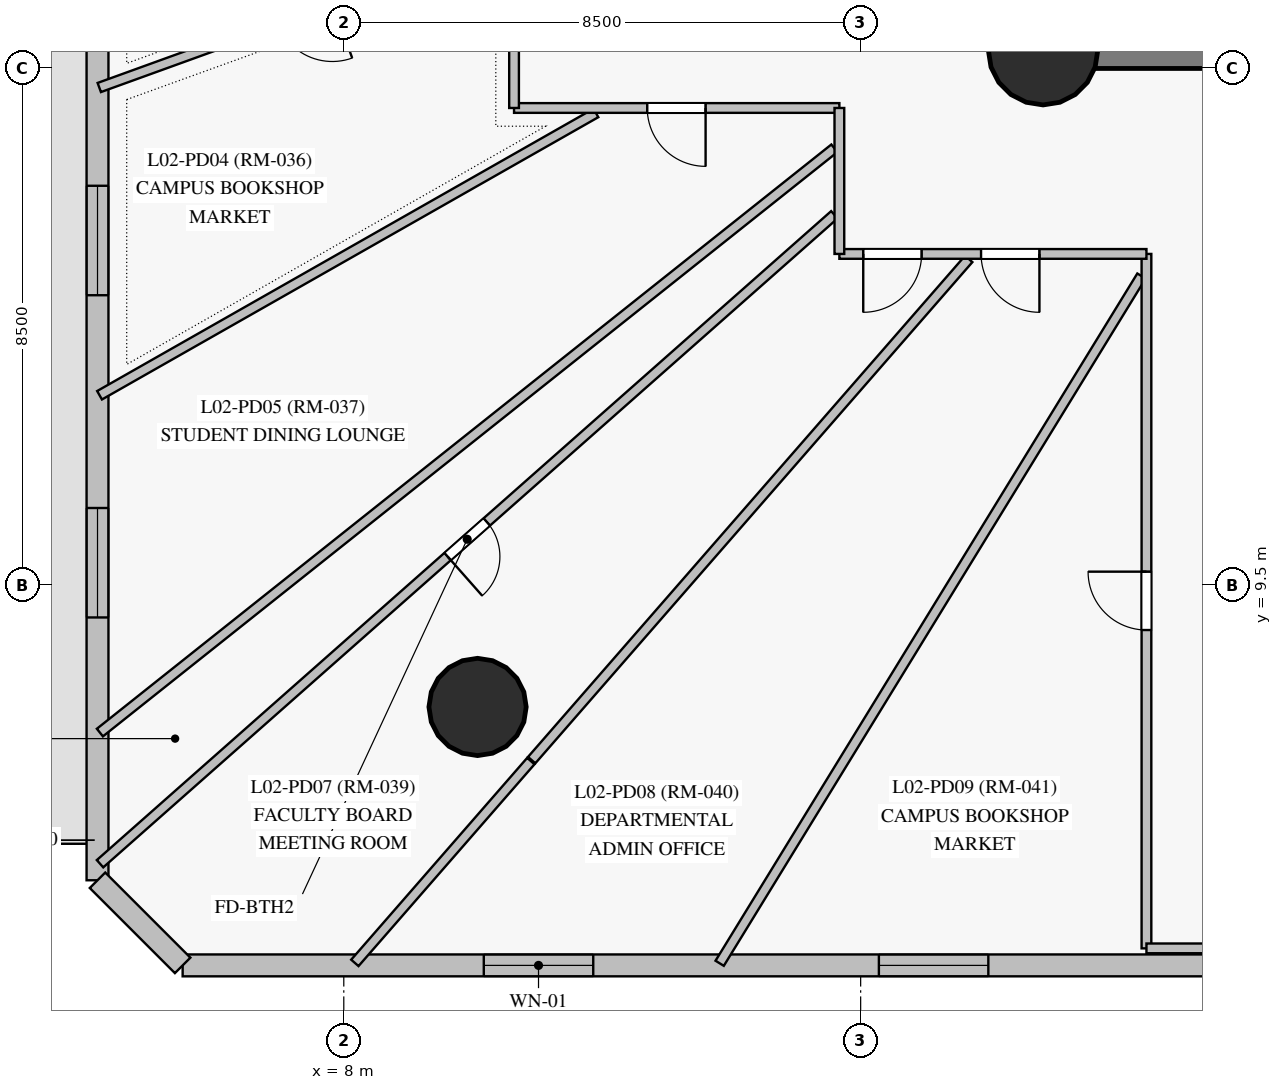
"""IFC4 building model, lengths in metres.
Left out: names, types, materials, properties, quantities, classifications, styles, units other than length and angle.
Written with IfcOpenShell. Run it as: python <this file> out.ifc"""

import sys

from ifc_helpers import new_model, si_unit, direction, frame, frame_2d, origin, origin_with_axes, origin_2d, place, context, subcontext, project, spatial, rectangle, circle, extrude, source, transform, mapped, element, fill, save


model = new_model("IFC4")
c1 = context("Model", 3, precision=1e-05, world=origin(), true_north=direction((0.0, 1.0)))
c2 = subcontext(c1, "Body", "Model", "MODEL_VIEW")
j1 = project(units=[si_unit("LENGTHUNIT", "METRE"), si_unit("PLANEANGLEUNIT", "RADIAN")], contexts=[c1])
p1 = place(None, origin())
s1 = spatial("IfcSite", under=j1, at=p1, CompositionType="ELEMENT")
p2 = place(p1, origin())
s2 = spatial("IfcBuilding", under=s1, at=p2, CompositionType="ELEMENT")
p3 = place(p2, frame((0.0, 0.0, 9.0)))
s3 = spatial("IfcBuildingStorey", under=s2, at=p3, CompositionType="ELEMENT", Elevation=9.0)
p4 = place(p3, frame((19.5, 18.3, 0.0), z_axis=(0.0, 0.0, 1.0), x_axis=(1.0, 0.0, 0.0)))
e1 = element("IfcWall", 1, at=p4, inside=s3, PredefinedType="SHEAR", context=c2, shape_type="SweptSolid", body=[
    extrude(rectangle(XDim=7.05, YDim=0.6, at=frame_2d((3.525, 0.0))), origin(), (0.0, 0.0, 1.0), 4.2),
])
p5 = place(p4, frame((4.2, 0.0, 0.0)))
e2 = element("IfcOpeningElement", 2, at=p5, cuts=e1, PredefinedType="OPENING", context=c2, shape_type="SweptSolid", body=[
    extrude(rectangle(XDim=1.4, YDim=2.2, at=frame_2d((0.7, 1.1))), frame((0.0, 0.31, 0.0), z_axis=(0.0, -1.0, 0.0), x_axis=(1.0, 0.0, 0.0)), (0.0, 0.0, 1.0), 0.62),
])
m1 = source(origin_with_axes(), c2, "Body", "SweptSolid", [
    extrude(circle(Radius=0.9, at=origin_2d()), origin(), (0.0, 0.0, 1.0), 4.5),
])
p6 = place(p3, frame((19.5, 18.3, 0.0), z_axis=(0.0, 0.0, 1.0), x_axis=(1.0, 0.0, 0.0)))
e3 = element("IfcColumn", 3, at=p6, inside=s3, PredefinedType="COLUMN", context=c2, shape_type="MappedRepresentation", body=[
    mapped(m1, transform((0.0, 0.0, 0.0), scale=1.0)),
])
m2 = source(origin_with_axes(), c2, "Body", "SweptSolid", [
    extrude(circle(Radius=0.8, at=origin_2d()), origin(), (0.0, 0.0, 1.0), 4.5),
])
p7 = place(p3, frame((10.2, 7.5, 0.0), z_axis=(0.0, 0.0, 1.0), x_axis=(1.0, 0.0, 0.0)))
e4 = element("IfcColumn", 4, at=p7, inside=s3, PredefinedType="COLUMN", context=c2, shape_type="MappedRepresentation", body=[
    mapped(m2, transform((0.0, 0.0, 0.0), scale=1.0)),
])
p8 = place(p3, frame((5.35, 3.25, 0.0), z_axis=(0.0, 0.0, 1.0), x_axis=(1.0, 0.0, 0.0)))
e5 = element("IfcWall", 5, at=p8, inside=s3, PredefinedType="SOLIDWALL", context=c2, shape_type="SweptSolid", body=[
    extrude(rectangle(XDim=49.25, YDim=0.36, at=frame_2d((24.625, 0.0))), origin(), (0.0, 0.0, 1.0), 4.2),
])
p9 = place(p8, frame((4.952, 0.0, 0.85)))
e6 = element("IfcOpeningElement", 6, at=p9, cuts=e5, PredefinedType="OPENING", context=c2, shape_type="SweptSolid", body=[
    extrude(rectangle(XDim=1.8, YDim=2.2, at=frame_2d((0.9, 1.1))), frame((0.0, 0.19, 0.0), z_axis=(0.0, -1.0, 0.0), x_axis=(1.0, 0.0, 0.0)), (0.0, 0.0, 1.0), 0.38),
])
p10 = place(p8, frame((11.45, 0.0, 0.85)))
e7 = element("IfcOpeningElement", 7, at=p10, cuts=e5, PredefinedType="OPENING", context=c2, shape_type="SweptSolid", body=[
    extrude(rectangle(XDim=1.8, YDim=2.2, at=frame_2d((0.9, 1.1))), frame((0.0, 0.19, 0.0), z_axis=(0.0, -1.0, 0.0), x_axis=(1.0, 0.0, 0.0)), (0.0, 0.0, 1.0), 0.38),
])
p11 = place(p8, frame((17.05, 0.0, 0.85)))
e8 = element("IfcOpeningElement", 8, at=p11, cuts=e5, PredefinedType="OPENING", context=c2, shape_type="SweptSolid", body=[
    extrude(rectangle(XDim=1.8, YDim=2.2, at=frame_2d((0.9, 1.1))), frame((0.0, 0.19, 0.0), z_axis=(0.0, -1.0, 0.0), x_axis=(1.0, 0.0, 0.0)), (0.0, 0.0, 1.0), 0.38),
])
p12 = place(p8, frame((23.505, 0.0, 0.85)))
e9 = element("IfcOpeningElement", 9, at=p12, cuts=e5, PredefinedType="OPENING", context=c2, shape_type="SweptSolid", body=[
    extrude(rectangle(XDim=1.8, YDim=2.2, at=frame_2d((0.9, 1.1))), frame((0.0, 0.19, 0.0), z_axis=(0.0, -1.0, 0.0), x_axis=(1.0, 0.0, 0.0)), (0.0, 0.0, 1.0), 0.38),
])
p13 = place(p8, frame((29.567, 0.0, 0.85)))
e10 = element("IfcOpeningElement", 10, at=p13, cuts=e5, PredefinedType="OPENING", context=c2, shape_type="SweptSolid", body=[
    extrude(rectangle(XDim=1.8, YDim=2.2, at=frame_2d((0.9, 1.1))), frame((0.0, 0.19, 0.0), z_axis=(0.0, -1.0, 0.0), x_axis=(1.0, 0.0, 0.0)), (0.0, 0.0, 1.0), 0.38),
])
p14 = place(p8, frame((33.402, 0.0, 0.85)))
e11 = element("IfcOpeningElement", 11, at=p14, cuts=e5, PredefinedType="OPENING", context=c2, shape_type="SweptSolid", body=[
    extrude(rectangle(XDim=1.8, YDim=2.2, at=frame_2d((0.9, 1.1))), frame((0.0, 0.19, 0.0), z_axis=(0.0, -1.0, 0.0), x_axis=(1.0, 0.0, 0.0)), (0.0, 0.0, 1.0), 0.38),
])
p15 = place(p8, frame((37.118, 0.0, 0.85)))
e12 = element("IfcOpeningElement", 12, at=p15, cuts=e5, PredefinedType="OPENING", context=c2, shape_type="SweptSolid", body=[
    extrude(rectangle(XDim=1.8, YDim=2.2, at=frame_2d((0.9, 1.1))), frame((0.0, 0.19, 0.0), z_axis=(0.0, -1.0, 0.0), x_axis=(1.0, 0.0, 0.0)), (0.0, 0.0, 1.0), 0.38),
])
p16 = place(p8, frame((42.171, 0.0, 0.85)))
e13 = element("IfcOpeningElement", 13, at=p16, cuts=e5, PredefinedType="OPENING", context=c2, shape_type="SweptSolid", body=[
    extrude(rectangle(XDim=1.8, YDim=2.2, at=frame_2d((0.9, 1.1))), frame((0.0, 0.19, 0.0), z_axis=(0.0, -1.0, 0.0), x_axis=(1.0, 0.0, 0.0)), (0.0, 0.0, 1.0), 0.38),
])
p17 = place(p8, frame((46.742, 0.0, 0.85)))
e14 = element("IfcOpeningElement", 14, at=p17, cuts=e5, PredefinedType="OPENING", context=c2, shape_type="SweptSolid", body=[
    extrude(rectangle(XDim=1.8, YDim=2.2, at=frame_2d((0.9, 1.1))), frame((0.0, 0.19, 0.0), z_axis=(0.0, -1.0, 0.0), x_axis=(1.0, 0.0, 0.0)), (0.0, 0.0, 1.0), 0.38),
])
p18 = place(p3, frame((3.95, 48.35, 0.0), z_axis=(0.0, 0.0, 1.0), x_axis=(0.0, -1.0, 0.0)))
e15 = element("IfcWall", 15, at=p18, inside=s3, PredefinedType="SOLIDWALL", context=c2, shape_type="SweptSolid", body=[
    extrude(rectangle(XDim=43.7, YDim=0.36, at=frame_2d((21.85, 0.0))), origin(), (0.0, 0.0, 1.0), 4.2),
])
p19 = place(p18, frame((1.439, 0.0, 0.85)))
e16 = element("IfcOpeningElement", 16, at=p19, cuts=e15, PredefinedType="OPENING", context=c2, shape_type="SweptSolid", body=[
    extrude(rectangle(XDim=1.8, YDim=2.2, at=frame_2d((0.9, 1.1))), frame((0.0, 0.19, 0.0), z_axis=(0.0, -1.0, 0.0), x_axis=(1.0, 0.0, 0.0)), (0.0, 0.0, 1.0), 0.38),
])
p20 = place(p18, frame((5.669, 0.0, 0.85)))
e17 = element("IfcOpeningElement", 17, at=p20, cuts=e15, PredefinedType="OPENING", context=c2, shape_type="SweptSolid", body=[
    extrude(rectangle(XDim=1.8, YDim=2.2, at=frame_2d((0.9, 1.1))), frame((0.0, 0.19, 0.0), z_axis=(0.0, -1.0, 0.0), x_axis=(1.0, 0.0, 0.0)), (0.0, 0.0, 1.0), 0.38),
])
p21 = place(p18, frame((15.485, 0.0, 0.85)))
e18 = element("IfcOpeningElement", 18, at=p21, cuts=e15, PredefinedType="OPENING", context=c2, shape_type="SweptSolid", body=[
    extrude(rectangle(XDim=1.8, YDim=2.2, at=frame_2d((0.9, 1.1))), frame((0.0, 0.19, 0.0), z_axis=(0.0, -1.0, 0.0), x_axis=(1.0, 0.0, 0.0)), (0.0, 0.0, 1.0), 0.38),
])
p22 = place(p18, frame((20.96, 0.0, 0.85)))
e19 = element("IfcOpeningElement", 19, at=p22, cuts=e15, PredefinedType="OPENING", context=c2, shape_type="SweptSolid", body=[
    extrude(rectangle(XDim=1.8, YDim=2.2, at=frame_2d((0.9, 1.1))), frame((0.0, 0.19, 0.0), z_axis=(0.0, -1.0, 0.0), x_axis=(1.0, 0.0, 0.0)), (0.0, 0.0, 1.0), 0.38),
])
p23 = place(p18, frame((28.012, 0.0, 0.85)))
e20 = element("IfcOpeningElement", 20, at=p23, cuts=e15, PredefinedType="OPENING", context=c2, shape_type="SweptSolid", body=[
    extrude(rectangle(XDim=1.8, YDim=2.2, at=frame_2d((0.9, 1.1))), frame((0.0, 0.19, 0.0), z_axis=(0.0, -1.0, 0.0), x_axis=(1.0, 0.0, 0.0)), (0.0, 0.0, 1.0), 0.38),
])
p24 = place(p18, frame((32.279, 0.0, 0.85)))
e21 = element("IfcOpeningElement", 21, at=p24, cuts=e15, PredefinedType="OPENING", context=c2, shape_type="SweptSolid", body=[
    extrude(rectangle(XDim=1.8, YDim=2.2, at=frame_2d((0.9, 1.1))), frame((0.0, 0.19, 0.0), z_axis=(0.0, -1.0, 0.0), x_axis=(1.0, 0.0, 0.0)), (0.0, 0.0, 1.0), 0.38),
])
p25 = place(p18, frame((37.578, 0.0, 0.85)))
e22 = element("IfcOpeningElement", 22, at=p25, cuts=e15, PredefinedType="OPENING", context=c2, shape_type="SweptSolid", body=[
    extrude(rectangle(XDim=1.8, YDim=2.2, at=frame_2d((0.9, 1.1))), frame((0.0, 0.19, 0.0), z_axis=(0.0, -1.0, 0.0), x_axis=(1.0, 0.0, 0.0)), (0.0, 0.0, 1.0), 0.38),
])
p26 = place(p18, frame((12.221, 0.0, 0.0)))
e23 = element("IfcOpeningElement", 23, at=p26, cuts=e15, PredefinedType="OPENING", context=c2, shape_type="SweptSolid", body=[
    extrude(rectangle(XDim=1.05, YDim=2.12, at=frame_2d((0.525, 1.06))), frame((0.0, 0.19, 0.0), z_axis=(0.0, -1.0, 0.0), x_axis=(1.0, 0.0, 0.0)), (0.0, 0.0, 1.0), 0.38),
])
p27 = place(p3, frame((3.95, 4.65, 0.0), z_axis=(0.0, 0.0, 1.0), x_axis=(0.707168432242, -0.707045124756, 0.0)))
e24 = element("IfcWall", 24, at=p27, inside=s3, PredefinedType="SOLIDWALL", context=c2, shape_type="SweptSolid", body=[
    extrude(rectangle(XDim=1.98, YDim=0.36, at=frame_2d((0.99, 0.0))), origin(), (0.0, 0.0, 1.0), 4.2),
])
p28 = place(p3, frame((16.068, 15.594, 0.0), z_axis=(0.0, 0.0, 1.0), x_axis=(-0.749344293453, -0.662180587052, 0.0)))
e25 = element("IfcWall", 25, at=p28, inside=s3, PredefinedType="PARTITIONING", context=c2, shape_type="SweptSolid", body=[
    extrude(rectangle(XDim=16.117, YDim=0.16, at=frame_2d((8.058, 0.0))), origin(), (0.0, 0.0, 1.0), 4.2),
])
p29 = place(p28, frame((7.628, 0.0, 0.0)))
e26 = element("IfcOpeningElement", 26, at=p29, cuts=e25, PredefinedType="OPENING", context=c2, shape_type="SweptSolid", body=[
    extrude(rectangle(XDim=0.86, YDim=2.04, at=frame_2d((0.43, 1.02))), frame((0.0, 0.09, 0.0), z_axis=(0.0, -1.0, 0.0), x_axis=(1.0, 0.0, 0.0)), (0.0, 0.0, 1.0), 0.18),
])
p30 = place(p3, frame((16.068, 16.687, 0.0), z_axis=(0.0, 0.0, 1.0), x_axis=(-0.782592647396, -0.622534134198, 0.0)))
e27 = element("IfcWall", 27, at=p30, inside=s3, PredefinedType="PARTITIONING", context=c2, shape_type="SweptSolid", body=[
    extrude(rectangle(XDim=15.435, YDim=0.16, at=frame_2d((7.717, 0.0))), origin(), (0.0, 0.0, 1.0), 4.2),
])
p31 = place(p3, frame((21.118, 14.587, 0.0), z_axis=(0.0, 0.0, 1.0), x_axis=(-0.523082178692, -0.852282250393, 0.0)))
e28 = element("IfcWall", 28, at=p31, inside=s3, PredefinedType="PARTITIONING", context=c2, shape_type="SweptSolid", body=[
    extrude(rectangle(XDim=13.261, YDim=0.16, at=frame_2d((6.63, 0.0))), origin(), (0.0, 0.0, 1.0), 4.2),
])
p32 = place(p3, frame((21.2, 3.53, 0.0), z_axis=(0.0, 0.0, 1.0), x_axis=(0.0, 1.0, 0.0)))
e29 = element("IfcWall", 29, at=p32, inside=s3, PredefinedType="PARTITIONING", context=c2, shape_type="SweptSolid", body=[
    extrude(rectangle(XDim=11.42, YDim=0.16, at=frame_2d((5.71, 0.0))), origin(), (0.0, 0.0, 1.0), 4.2),
])
p33 = place(p32, frame((5.235, 0.0, 0.0)))
e30 = element("IfcOpeningElement", 30, at=p33, cuts=e29, PredefinedType="OPENING", context=c2, shape_type="SweptSolid", body=[
    extrude(rectangle(XDim=0.96, YDim=2.15, at=frame_2d((0.48, 1.075))), frame((0.0, 0.09, 0.0), z_axis=(0.0, -1.0, 0.0), x_axis=(1.0, 0.0, 0.0)), (0.0, 0.0, 1.0), 0.18),
])
p34 = place(p3, frame((18.277, 14.868, 0.0), z_axis=(0.0, 0.0, 1.0), x_axis=(-0.657226588959, -0.753693048108, 0.0)))
e31 = element("IfcWall", 31, at=p34, inside=s3, PredefinedType="PARTITIONING", context=c2, shape_type="SweptSolid", body=[
    extrude(rectangle(XDim=10.936, YDim=0.16, at=frame_2d((5.468, 0.0))), origin(), (0.0, 0.0, 1.0), 4.2),
])
p35 = place(p3, frame((12.146, 17.268, 0.0), z_axis=(0.0, 0.0, 1.0), x_axis=(-0.869250906181, -0.494371178472, 0.0)))
e32 = element("IfcWall", 32, at=p35, inside=s3, PredefinedType="PARTITIONING", context=c2, shape_type="SweptSolid", body=[
    extrude(rectangle(XDim=9.39, YDim=0.16, at=frame_2d((4.695, 0.0))), origin(), (0.0, 0.0, 1.0), 4.2),
])
p36 = place(p3, frame((10.718, 20.126, 0.0), z_axis=(0.0, 0.0, 1.0), x_axis=(-0.940278821487, -0.340405255339, 0.0)))
e33 = element("IfcWall", 33, at=p36, inside=s3, PredefinedType="PARTITIONING", context=c2, shape_type="SweptSolid", body=[
    extrude(rectangle(XDim=7.167, YDim=0.16, at=frame_2d((3.583, 0.0))), origin(), (0.0, 0.0, 1.0), 4.2),
])
p37 = place(p36, frame((3.091, 0.0, 0.0)))
e34 = element("IfcOpeningElement", 34, at=p37, cuts=e33, PredefinedType="OPENING", context=c2, shape_type="SweptSolid", body=[
    extrude(rectangle(XDim=0.96, YDim=2.15, at=frame_2d((0.48, 1.075))), frame((0.0, 0.09, 0.0), z_axis=(0.0, -1.0, 0.0), x_axis=(1.0, 0.0, 0.0)), (0.0, 0.0, 1.0), 0.18),
])
p38 = place(p3, frame((16.15, 17.35, 0.0), z_axis=(0.0, 0.0, 1.0), x_axis=(-1.0, 0.0, 0.0)))
e35 = element("IfcWall", 35, at=p38, inside=s3, PredefinedType="PARTITIONING", context=c2, shape_type="SweptSolid", body=[
    extrude(rectangle(XDim=5.35, YDim=0.16, at=frame_2d((2.675, 0.0))), origin(), (0.0, 0.0, 1.0), 4.2),
])
p39 = place(p38, frame((2.2, 0.0, 0.0)))
e36 = element("IfcOpeningElement", 36, at=p39, cuts=e35, PredefinedType="OPENING", context=c2, shape_type="SweptSolid", body=[
    extrude(rectangle(XDim=0.96, YDim=2.15, at=frame_2d((0.48, 1.075))), frame((0.0, 0.09, 0.0), z_axis=(0.0, -1.0, 0.0), x_axis=(1.0, 0.0, 0.0)), (0.0, 0.0, 1.0), 0.18),
])
p40 = place(p3, frame((21.2, 14.95, 0.0), z_axis=(0.0, 0.0, 1.0), x_axis=(-1.0, 0.0, 0.0)))
e37 = element("IfcWall", 37, at=p40, inside=s3, PredefinedType="PARTITIONING", context=c2, shape_type="SweptSolid", body=[
    extrude(rectangle(XDim=5.05, YDim=0.16, at=frame_2d((2.525, 0.0))), origin(), (0.0, 0.0, 1.0), 4.2),
])
p41 = place(p40, frame((3.698, 0.0, 0.0)))
e38 = element("IfcOpeningElement", 38, at=p41, cuts=e37, PredefinedType="OPENING", context=c2, shape_type="SweptSolid", body=[
    extrude(rectangle(XDim=0.96, YDim=2.15, at=frame_2d((0.48, 1.075))), frame((0.0, 0.09, 0.0), z_axis=(0.0, -1.0, 0.0), x_axis=(1.0, 0.0, 0.0)), (0.0, 0.0, 1.0), 0.18),
])
p42 = place(p40, frame((1.76, 0.0, 0.0)))
e39 = element("IfcOpeningElement", 39, at=p42, cuts=e37, PredefinedType="OPENING", context=c2, shape_type="SweptSolid", body=[
    extrude(rectangle(XDim=0.96, YDim=2.15, at=frame_2d((0.48, 1.075))), frame((0.0, 0.09, 0.0), z_axis=(0.0, -1.0, 0.0), x_axis=(1.0, 0.0, 0.0)), (0.0, 0.0, 1.0), 0.18),
])
p43 = place(p3, frame((11.076, 6.61, 0.0), z_axis=(0.0, 0.0, 1.0), x_axis=(-0.657196582962, -0.753719212534, 0.0)))
e40 = element("IfcWall", 40, at=p43, inside=s3, PredefinedType="PARTITIONING", context=c2, shape_type="SweptSolid", body=[
    extrude(rectangle(XDim=4.404, YDim=0.16, at=frame_2d((2.202, 0.0))), origin(), (0.0, 0.0, 1.0), 4.2),
])
p44 = place(p3, frame((25.4, 3.53, 0.0), z_axis=(0.0, 0.0, 1.0), x_axis=(-1.0, 0.0, 0.0)))
e41 = element("IfcWall", 41, at=p44, inside=s3, PredefinedType="PARTITIONING", context=c2, shape_type="SweptSolid", body=[
    extrude(rectangle(XDim=4.2, YDim=0.16, at=frame_2d((2.1, 0.0))), origin(), (0.0, 0.0, 1.0), 4.2),
])
p45 = place(p3, frame((10.8, 17.35, 0.0), z_axis=(0.0, 0.0, 1.0), x_axis=(0.0, 1.0, 0.0)))
e42 = element("IfcWall", 42, at=p45, inside=s3, PredefinedType="PARTITIONING", context=c2, shape_type="SweptSolid", body=[
    extrude(rectangle(XDim=3.07, YDim=0.16, at=frame_2d((1.535, 0.0))), origin(), (0.0, 0.0, 1.0), 3.25),
])
p46 = place(p45, frame((1.06, 0.0, 0.0)))
e43 = element("IfcOpeningElement", 43, at=p46, cuts=e42, PredefinedType="OPENING", context=c2, shape_type="SweptSolid", body=[
    extrude(rectangle(XDim=0.96, YDim=2.15, at=frame_2d((0.48, 1.075))), frame((0.0, 0.09, 0.0), z_axis=(0.0, -1.0, 0.0), x_axis=(1.0, 0.0, 0.0)), (0.0, 0.0, 1.0), 0.18),
])
p47 = place(p3, frame((16.15, 14.95, 0.0), z_axis=(0.0, 0.0, 1.0), x_axis=(0.0, 1.0, 0.0)))
e44 = element("IfcWall", 44, at=p47, inside=s3, PredefinedType="PARTITIONING", context=c2, shape_type="SweptSolid", body=[
    extrude(rectangle(XDim=2.4, YDim=0.16, at=frame_2d((1.2, 0.0))), origin(), (0.0, 0.0, 1.0), 3.25),
])
m3 = source(origin_with_axes(), c2, "Body", "SweptSolid", [
    extrude(rectangle(XDim=1.8, YDim=2.2, at=frame_2d((0.9, 1.1))), frame((0.0, 0.03, 0.0), z_axis=(0.0, -1.0, 0.0), x_axis=(1.0, 0.0, 0.0)), (0.0, 0.0, 1.0), 0.06),
])
p48 = place(p9, origin())
e45 = element("IfcWindow", 45, at=p48, inside=s3, PartitioningType="SINGLE_PANEL", PredefinedType="WINDOW", context=c2, shape_type="MappedRepresentation", body=[
    mapped(m3, transform((0.0, 0.0, 0.0), scale=1.0)),
])
fill(e6, e45)
p49 = place(p10, origin())
e46 = element("IfcWindow", 46, at=p49, inside=s3, PartitioningType="SINGLE_PANEL", PredefinedType="WINDOW", context=c2, shape_type="MappedRepresentation", body=[
    mapped(m3, transform((0.0, 0.0, 0.0), scale=1.0)),
])
fill(e7, e46)
p50 = place(p24, origin())
e47 = element("IfcWindow", 47, at=p50, inside=s3, PartitioningType="SINGLE_PANEL", PredefinedType="WINDOW", context=c2, shape_type="MappedRepresentation", body=[
    mapped(m3, transform((0.0, 0.0, 0.0), scale=1.0)),
])
fill(e21, e47)
p51 = place(p25, origin())
e48 = element("IfcWindow", 48, at=p51, inside=s3, PartitioningType="SINGLE_PANEL", PredefinedType="WINDOW", context=c2, shape_type="MappedRepresentation", body=[
    mapped(m3, transform((0.0, 0.0, 0.0), scale=1.0)),
])
fill(e22, e48)
m4 = source(origin_with_axes(), c2, "Body", "SweptSolid", [
    extrude(rectangle(XDim=0.96, YDim=2.15, at=frame_2d((0.48, 1.075))), frame((0.0, 0.025, 0.0), z_axis=(0.0, -1.0, 0.0), x_axis=(1.0, 0.0, 0.0)), (0.0, 0.0, 1.0), 0.05),
])
p52 = place(p39, origin())
e49 = element("IfcDoor", 49, at=p52, inside=s3, OperationType="SINGLE_SWING_LEFT", PredefinedType="DOOR", context=c2, shape_type="MappedRepresentation", body=[
    mapped(m4, transform((0.0, 0.0, 0.0), scale=1.0)),
])
fill(e36, e49)
p53 = place(p41, origin())
e50 = element("IfcDoor", 50, at=p53, inside=s3, OperationType="SINGLE_SWING_RIGHT", PredefinedType="DOOR", context=c2, shape_type="MappedRepresentation", body=[
    mapped(m4, transform((0.0, 0.0, 0.0), scale=1.0)),
])
fill(e38, e50)
p54 = place(p42, origin())
e51 = element("IfcDoor", 51, at=p54, inside=s3, OperationType="SINGLE_SWING_LEFT", PredefinedType="DOOR", context=c2, shape_type="MappedRepresentation", body=[
    mapped(m4, transform((0.0, 0.0, 0.0), scale=1.0)),
])
fill(e39, e51)
p55 = place(p33, origin())
e52 = element("IfcDoor", 52, at=p55, inside=s3, OperationType="SINGLE_SWING_RIGHT", PredefinedType="DOOR", context=c2, shape_type="MappedRepresentation", body=[
    mapped(m4, transform((0.0, 0.0, 0.0), scale=1.0)),
])
fill(e30, e52)
m5 = source(origin_with_axes(), c2, "Body", "SweptSolid", [
    extrude(rectangle(XDim=0.86, YDim=2.04, at=frame_2d((0.43, 1.02))), frame((0.0, 0.025, 0.0), z_axis=(0.0, -1.0, 0.0), x_axis=(1.0, 0.0, 0.0)), (0.0, 0.0, 1.0), 0.05),
])
p56 = place(p29, origin())
e53 = element("IfcDoor", 53, at=p56, inside=s3, OperationType="SINGLE_SWING_RIGHT", PredefinedType="DOOR", context=c2, shape_type="MappedRepresentation", body=[
    mapped(m5, transform((0.0, 0.0, 0.0), scale=1.0)),
])
fill(e26, e53)
save(model, sys.argv[1])
